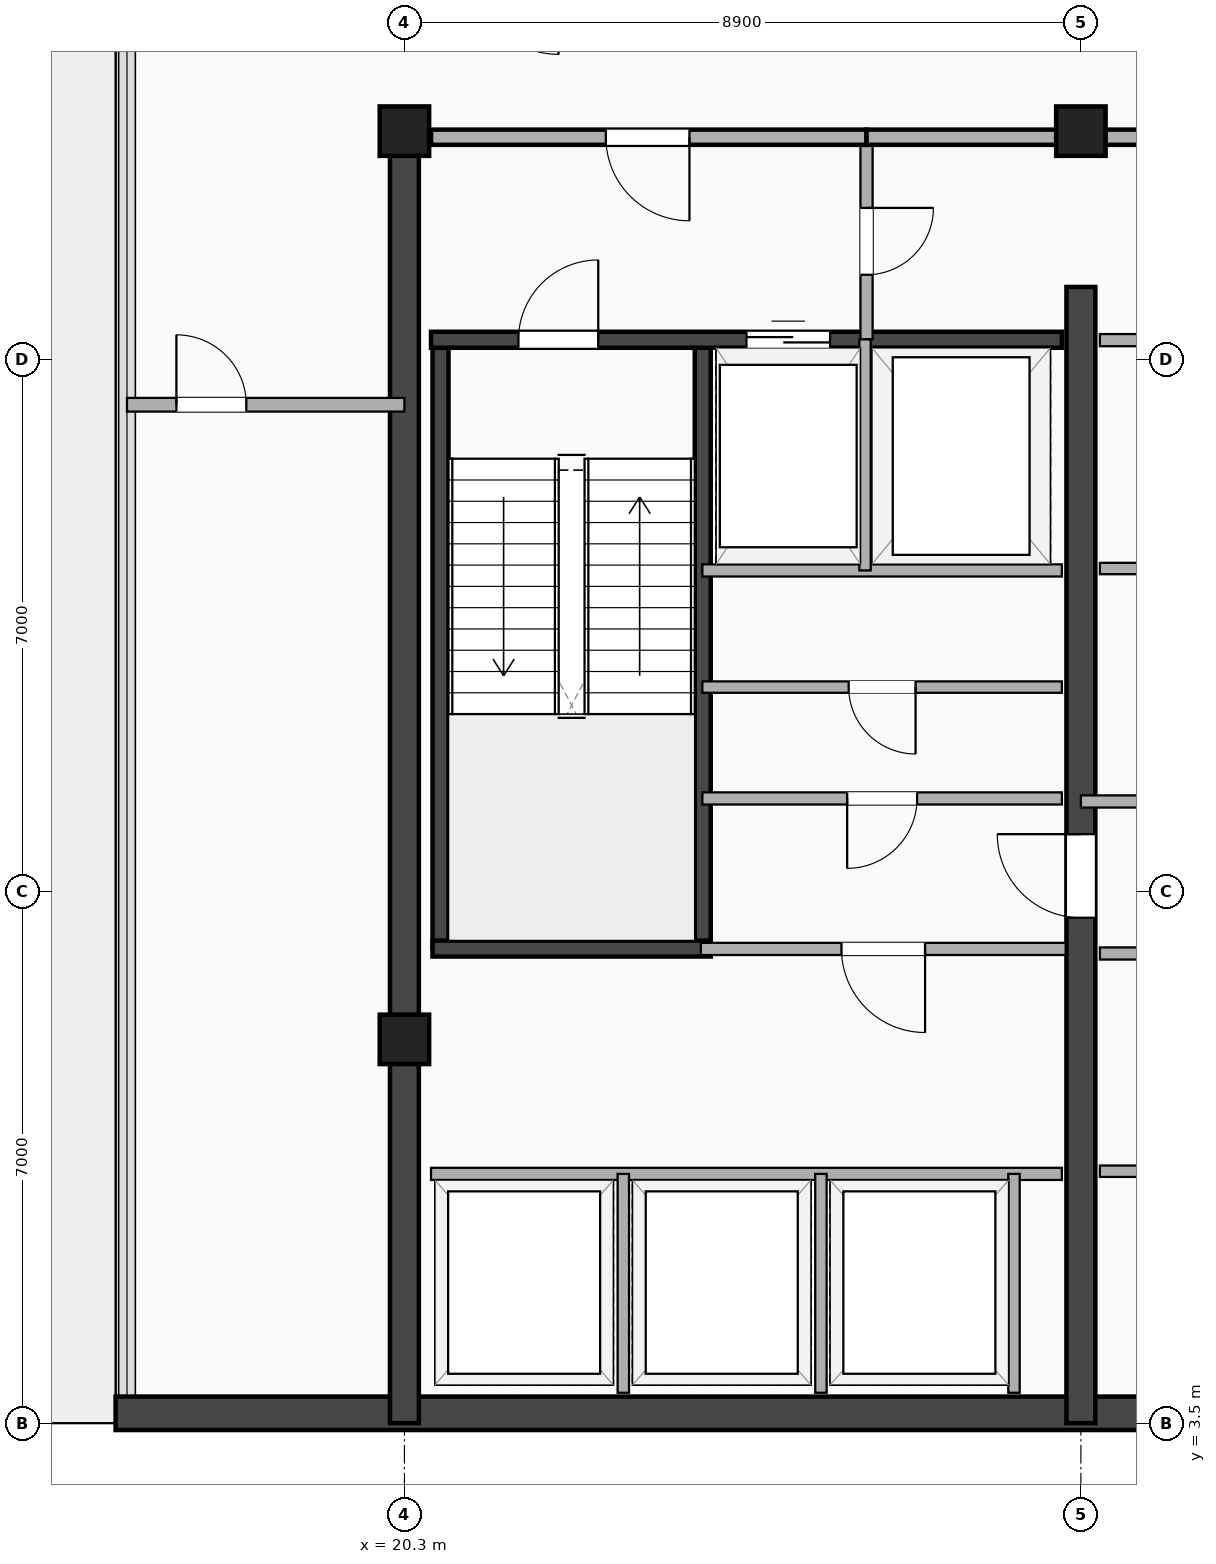
"""IFC4 building model, lengths in metres.
Left out: names, types, materials, properties, quantities, classifications, styles, units other than length and angle.
Written with IfcOpenShell. Run it as: python <this file> out.ifc"""

import sys

from ifc_helpers import new_model, si_unit, direction, frame, frame_2d, origin, origin_2d, place, context, subcontext, project, spatial, rectangle, extrude, element, fill, save


model = new_model("IFC4")
c1 = context("Model", 3, precision=1e-05, world=origin(), true_north=direction((0.0, 1.0)))
c2 = subcontext(c1, "Body", "Model", "MODEL_VIEW")
j1 = project(units=[si_unit("LENGTHUNIT", "METRE"), si_unit("PLANEANGLEUNIT", "RADIAN")], contexts=[c1])
p1 = place(None, origin())
s1 = spatial("IfcSite", under=j1, at=p1, CompositionType="ELEMENT")
p2 = place(p1, origin())
s2 = spatial("IfcBuilding", under=s1, at=p2, CompositionType="ELEMENT")
p3 = place(p2, frame((0.0, 0.0, 298.7)))
s3 = spatial("IfcBuildingStorey", under=s2, at=p3, CompositionType="ELEMENT", Elevation=298.7)
p4 = place(p3, frame((16.5, 3.63, 0.0), z_axis=(0.0, 0.0, 1.0), x_axis=(1.0, 0.0, 0.0)))
e1 = element("IfcWall", 1, at=p4, inside=s3, PredefinedType="SHEAR", context=c2, shape_type="SweptSolid", body=[
    extrude(rectangle(XDim=29.6, YDim=0.44, at=frame_2d((14.8, 0.0))), origin(), (0.0, 0.0, 1.0), 4.3),
])
p5 = place(p3, frame((20.3, 3.5, 0.0), z_axis=(0.0, 0.0, 1.0), x_axis=(0.0, 1.0, 0.0)))
e2 = element("IfcWall", 2, at=p5, inside=s3, PredefinedType="SHEAR", context=c2, shape_type="SweptSolid", body=[
    extrude(rectangle(XDim=16.9, YDim=0.38, at=frame_2d((8.45, 0.0))), origin(), (0.0, 0.0, 1.0), 4.3),
])
p6 = place(p3, frame((29.2, 3.5, 0.0), z_axis=(0.0, 0.0, 1.0), x_axis=(0.0, 1.0, 0.0)))
e3 = element("IfcWall", 3, at=p6, inside=s3, PredefinedType="SHEAR", context=c2, shape_type="SweptSolid", body=[
    extrude(rectangle(XDim=14.95, YDim=0.38, at=frame_2d((7.475, 0.0))), origin(), (0.0, 0.0, 1.0), 4.3),
])
p7 = place(p6, frame((7.75, 0.0, 0.0), z_axis=(0.0, 0.0, 1.0), x_axis=(-1.0, 0.0, 0.0)))
e4 = element("IfcOpeningElement", 4, at=p7, cuts=e3, PredefinedType="OPENING", context=c2, shape_type="SweptSolid", body=[
    extrude(rectangle(XDim=1.1, YDim=2.15, at=frame_2d((0.55, 1.075))), frame((0.0, 0.2, 0.0), z_axis=(0.0, -1.0, 0.0), x_axis=(1.0, 0.0, 0.0)), (0.0, 0.0, 1.0), 0.4),
])
for number, where, z_axis, x_axis in (
    (5, (20.775, 9.745, 0.0), (0.0, 0.0, 1.0), (0.0, 1.0, 0.0)),
    (6, (24.225, 9.745, 0.0), (0.0, 0.0, 1.0), (0.0, 1.0, 0.0)),
):
    element("IfcWall", number, at=place(p3, frame(where, z_axis=z_axis, x_axis=x_axis)), inside=s3, PredefinedType="SHEAR", context=c2, shape_type="SweptSolid", body=[
        extrude(rectangle(XDim=8.01, YDim=0.21, at=frame_2d((4.005, 0.0))), origin(), (0.0, 0.0, 1.0), 4.3),
    ])
p8 = place(p3, frame((20.67, 9.745, 0.0), z_axis=(0.0, 0.0, 1.0), x_axis=(1.0, 0.0, 0.0)))
e7 = element("IfcWall", 7, at=p8, inside=s3, PredefinedType="SHEAR", context=c2, shape_type="SweptSolid", body=[
    extrude(rectangle(XDim=3.66, YDim=0.21, at=frame_2d((1.83, 0.0))), origin(), (0.0, 0.0, 1.0), 4.3),
])
p9 = place(p3, frame((20.65, 17.755, 0.0), z_axis=(0.0, 0.0, 1.0), x_axis=(1.0, 0.0, 0.0)))
e8 = element("IfcWall", 8, at=p9, inside=s3, PredefinedType="SHEAR", context=c2, shape_type="SweptSolid", body=[
    extrude(rectangle(XDim=8.3, YDim=0.21, at=frame_2d((4.15, 0.0))), origin(), (0.0, 0.0, 1.0), 4.3),
])
p10 = place(p9, frame((2.2, 0.0, 0.0), z_axis=(0.0, 0.0, 1.0), x_axis=(-1.0, 0.0, 0.0)))
e9 = element("IfcOpeningElement", 9, at=p10, cuts=e8, PredefinedType="OPENING", context=c2, shape_type="SweptSolid", body=[
    extrude(rectangle(XDim=1.05, YDim=2.15, at=frame_2d((0.525, 1.075))), frame((0.0, 0.115, 0.0), z_axis=(0.0, -1.0, 0.0), x_axis=(1.0, 0.0, 0.0)), (0.0, 0.0, 1.0), 0.23),
])
p11 = place(p9, frame((4.15, 0.0, 0.0)))
e10 = element("IfcOpeningElement", 10, at=p11, cuts=e8, PredefinedType="OPENING", context=c2, shape_type="SweptSolid", body=[
    extrude(rectangle(XDim=1.1, YDim=2.18, at=frame_2d((0.55, 1.09))), frame((0.0, 0.115, 0.0), z_axis=(0.0, -1.0, 0.0), x_axis=(1.0, 0.0, 0.0)), (0.0, 0.0, 1.0), 0.23),
])
for number, where, z_axis, x_axis in (
    (11, (20.3, 8.55, -0.3), (0.0, 0.0, 1.0), (1.0, 0.0, 0.0)),
    (12, (20.3, 20.5, -0.3), (0.0, 0.0, 1.0), (1.0, 0.0, 0.0)),
    (13, (29.2, 20.5, -0.3), (0.0, 0.0, 1.0), (1.0, 0.0, 0.0)),
):
    element("IfcColumn", number, at=place(p3, frame(where, z_axis=z_axis, x_axis=x_axis)), inside=s3, PredefinedType="COLUMN", context=c2, shape_type="SweptSolid", body=[
        extrude(rectangle(XDim=0.65, YDim=0.65, at=origin_2d()), origin(), (0.0, 0.0, 1.0), 4.6),
    ])
p12 = place(p3, frame((26.38, 17.76, 0.0), z_axis=(0.0, 0.0, 1.0), x_axis=(0.0, 1.0, 0.0)))
e14 = element("IfcWall", 14, at=p12, inside=s3, PredefinedType="PARTITIONING", context=c2, shape_type="SweptSolid", body=[
    extrude(rectangle(XDim=2.66, YDim=0.16, at=frame_2d((1.33, 0.0))), origin(), (0.0, 0.0, 1.0), 3.512),
])
p13 = place(p12, frame((0.85, 0.0, 0.0)))
e15 = element("IfcOpeningElement", 15, at=p13, cuts=e14, PredefinedType="OPENING", context=c2, shape_type="SweptSolid", body=[
    extrude(rectangle(XDim=0.88, YDim=2.08, at=frame_2d((0.44, 1.04))), frame((0.0, 0.09, 0.0), z_axis=(0.0, -1.0, 0.0), x_axis=(1.0, 0.0, 0.0)), (0.0, 0.0, 1.0), 0.18),
])
p14 = place(p3, frame((24.22, 14.72, 0.0), z_axis=(0.0, 0.0, 1.0), x_axis=(1.0, 0.0, 0.0)))
e16 = element("IfcWall", 16, at=p14, inside=s3, PredefinedType="PARTITIONING", context=c2, shape_type="SweptSolid", body=[
    extrude(rectangle(XDim=4.73, YDim=0.16, at=frame_2d((2.365, 0.0))), origin(), (0.0, 0.0, 1.0), 4.3),
])
p15 = place(p3, frame((26.36, 14.72, 0.0), z_axis=(0.0, 0.0, 1.0), x_axis=(0.0, 1.0, 0.0)))
e17 = element("IfcWall", 17, at=p15, inside=s3, PredefinedType="PARTITIONING", context=c2, shape_type="SweptSolid", body=[
    extrude(rectangle(XDim=3.04, YDim=0.15, at=frame_2d((1.52, 0.0))), origin(), (0.0, 0.0, 1.0), 4.3),
])
p16 = place(p3, frame((20.65, 20.42, 0.0), z_axis=(0.0, 0.0, 1.0), x_axis=(1.0, 0.0, 0.0)))
e18 = element("IfcWall", 18, at=p16, inside=s3, PredefinedType="PARTITIONING", context=c2, shape_type="SweptSolid", body=[
    extrude(rectangle(XDim=5.73, YDim=0.2, at=frame_2d((2.865, 0.0))), origin(), (0.0, 0.0, 1.0), 2.605),
])
p17 = place(p16, frame((2.3, 0.0, 0.0)))
e19 = element("IfcOpeningElement", 19, at=p17, cuts=e18, PredefinedType="OPENING", context=c2, shape_type="SweptSolid", body=[
    extrude(rectangle(XDim=1.1, YDim=2.15, at=frame_2d((0.55, 1.075))), frame((0.0, 0.11, 0.0), z_axis=(0.0, -1.0, 0.0), x_axis=(1.0, 0.0, 0.0)), (0.0, 0.0, 1.0), 0.22),
])
p18 = place(p3, frame((26.38, 20.42, 0.0), z_axis=(0.0, 0.0, 1.0), x_axis=(1.0, 0.0, 0.0)))
e20 = element("IfcWall", 20, at=p18, inside=s3, PredefinedType="PARTITIONING", context=c2, shape_type="SweptSolid", body=[
    extrude(rectangle(XDim=2.82, YDim=0.2, at=frame_2d((1.41, 0.0))), origin(), (0.0, 0.0, 1.0), 2.605),
])
p19 = place(p3, frame((29.2, 20.42, 0.0), z_axis=(0.0, 0.0, 1.0), x_axis=(1.0, 0.0, 0.0)))
e21 = element("IfcWall", 21, at=p19, inside=s3, PredefinedType="PARTITIONING", context=c2, shape_type="SweptSolid", body=[
    extrude(rectangle(XDim=7.8, YDim=0.2, at=frame_2d((3.9, 0.0))), origin(), (0.0, 0.0, 1.0), 2.605),
])
p20 = place(p19, frame((3.409, 0.0, 0.0)))
e22 = element("IfcOpeningElement", 22, at=p20, cuts=e21, PredefinedType="OPENING", context=c2, shape_type="SweptSolid", body=[
    extrude(rectangle(XDim=1.1, YDim=2.15, at=frame_2d((0.55, 1.075))), frame((0.0, 0.11, 0.0), z_axis=(0.0, -1.0, 0.0), x_axis=(1.0, 0.0, 0.0)), (0.0, 0.0, 1.0), 0.22),
])
p21 = place(p3, frame((24.22, 11.72, 0.0), z_axis=(0.0, 0.0, 1.0), x_axis=(1.0, 0.0, 0.0)))
e23 = element("IfcWall", 23, at=p21, inside=s3, PredefinedType="PARTITIONING", context=c2, shape_type="SweptSolid", body=[
    extrude(rectangle(XDim=4.73, YDim=0.16, at=frame_2d((2.365, 0.0))), origin(), (0.0, 0.0, 1.0), 4.3),
])
p22 = place(p21, frame((1.905, 0.0, 0.0)))
e24 = element("IfcOpeningElement", 24, at=p22, cuts=e23, PredefinedType="OPENING", context=c2, shape_type="SweptSolid", body=[
    extrude(rectangle(XDim=0.92, YDim=2.08, at=frame_2d((0.46, 1.04))), frame((0.0, 0.09, 0.0), z_axis=(0.0, -1.0, 0.0), x_axis=(1.0, 0.0, 0.0)), (0.0, 0.0, 1.0), 0.18),
])
p23 = place(p3, frame((24.22, 13.185, 0.0), z_axis=(0.0, 0.0, 1.0), x_axis=(1.0, 0.0, 0.0)))
e25 = element("IfcWall", 25, at=p23, inside=s3, PredefinedType="PARTITIONING", context=c2, shape_type="SweptSolid", body=[
    extrude(rectangle(XDim=4.73, YDim=0.15, at=frame_2d((2.365, 0.0))), origin(), (0.0, 0.0, 1.0), 4.3),
])
p24 = place(p23, frame((1.925, 0.0, 0.0)))
e26 = element("IfcOpeningElement", 26, at=p24, cuts=e25, PredefinedType="OPENING", context=c2, shape_type="SweptSolid", body=[
    extrude(rectangle(XDim=0.88, YDim=2.08, at=frame_2d((0.44, 1.04))), frame((0.0, 0.085, 0.0), z_axis=(0.0, -1.0, 0.0), x_axis=(1.0, 0.0, 0.0)), (0.0, 0.0, 1.0), 0.17),
])
p25 = place(p3, frame((20.65, 6.78, 0.0), z_axis=(0.0, 0.0, 1.0), x_axis=(1.0, 0.0, 0.0)))
e27 = element("IfcWall", 27, at=p25, inside=s3, PredefinedType="PARTITIONING", context=c2, shape_type="SweptSolid", body=[
    extrude(rectangle(XDim=8.3, YDim=0.16, at=frame_2d((4.15, 0.0))), origin(), (0.0, 0.0, 1.0), 4.3),
])
for number, where, z_axis, x_axis in (
    (28, (23.18, 3.9, 0.0), (0.0, 0.0, 1.0), (0.0, 1.0, 0.0)),
    (29, (25.78, 3.9, 0.0), (0.0, 0.0, 1.0), (0.0, 1.0, 0.0)),
    (30, (28.32, 3.9, 0.0), (0.0, 0.0, 1.0), (0.0, 1.0, 0.0)),
):
    element("IfcWall", number, at=place(p3, frame(where, z_axis=z_axis, x_axis=x_axis)), inside=s3, PredefinedType="PARTITIONING", context=c2, shape_type="SweptSolid", body=[
        extrude(rectangle(XDim=2.88, YDim=0.15, at=frame_2d((1.44, 0.0))), origin(), (0.0, 0.0, 1.0), 4.3),
    ])
p26 = place(p3, frame((24.2, 9.74, 0.0), z_axis=(0.0, 0.0, 1.0), x_axis=(1.0, 0.0, 0.0)))
e31 = element("IfcWall", 31, at=p26, inside=s3, PredefinedType="PARTITIONING", context=c2, shape_type="SweptSolid", body=[
    extrude(rectangle(XDim=4.8, YDim=0.16, at=frame_2d((2.4, 0.0))), origin(), (0.0, 0.0, 1.0), 4.3),
])
p27 = place(p26, frame((1.85, 0.0, 0.0)))
e32 = element("IfcOpeningElement", 32, at=p27, cuts=e31, PredefinedType="OPENING", context=c2, shape_type="SweptSolid", body=[
    extrude(rectangle(XDim=1.1, YDim=2.15, at=frame_2d((0.55, 1.075))), frame((0.0, 0.09, 0.0), z_axis=(0.0, -1.0, 0.0), x_axis=(1.0, 0.0, 0.0)), (0.0, 0.0, 1.0), 0.18),
])
p28 = place(p3, frame((29.45, 9.68, 0.0), z_axis=(0.0, 0.0, 1.0), x_axis=(1.0, 0.0, 0.0)))
e33 = element("IfcWall", 33, at=p28, inside=s3, PredefinedType="PARTITIONING", context=c2, shape_type="SweptSolid", body=[
    extrude(rectangle(XDim=7.3, YDim=0.16, at=frame_2d((3.65, 0.0))), origin(), (0.0, 0.0, 1.0), 4.3),
])
p29 = place(p28, frame((4.11, 0.0, 0.0), z_axis=(0.0, 0.0, 1.0), x_axis=(-1.0, 0.0, 0.0)))
e34 = element("IfcOpeningElement", 34, at=p29, cuts=e33, PredefinedType="OPENING", context=c2, shape_type="SweptSolid", body=[
    extrude(rectangle(XDim=0.92, YDim=2.08, at=frame_2d((0.46, 1.04))), frame((0.0, 0.09, 0.0), z_axis=(0.0, -1.0, 0.0), x_axis=(1.0, 0.0, 0.0)), (0.0, 0.0, 1.0), 0.18),
])
p30 = place(p3, frame((29.45, 6.815, 0.0), z_axis=(0.0, 0.0, 1.0), x_axis=(1.0, 0.0, 0.0)))
e35 = element("IfcWall", 35, at=p30, inside=s3, PredefinedType="PARTITIONING", context=c2, shape_type="SweptSolid", body=[
    extrude(rectangle(XDim=7.3, YDim=0.15, at=frame_2d((3.65, 0.0))), origin(), (0.0, 0.0, 1.0), 4.3),
])
p31 = place(p30, frame((4.09, 0.0, 0.0), z_axis=(0.0, 0.0, 1.0), x_axis=(-1.0, 0.0, 0.0)))
e36 = element("IfcOpeningElement", 36, at=p31, cuts=e35, PredefinedType="OPENING", context=c2, shape_type="SweptSolid", body=[
    extrude(rectangle(XDim=0.88, YDim=2.08, at=frame_2d((0.44, 1.04))), frame((0.0, 0.085, 0.0), z_axis=(0.0, -1.0, 0.0), x_axis=(1.0, 0.0, 0.0)), (0.0, 0.0, 1.0), 0.17),
])
p32 = place(p3, frame((29.2, 11.68, 0.0), z_axis=(0.0, 0.0, 1.0), x_axis=(1.0, 0.0, 0.0)))
e37 = element("IfcWall", 37, at=p32, inside=s3, PredefinedType="PARTITIONING", context=c2, shape_type="SweptSolid", body=[
    extrude(rectangle(XDim=5.72, YDim=0.16, at=frame_2d((2.86, 0.0))), origin(), (0.0, 0.0, 1.0), 4.3),
])
p33 = place(p3, frame((29.45, 17.75, 0.0), z_axis=(0.0, 0.0, 1.0), x_axis=(1.0, 0.0, 0.0)))
e38 = element("IfcWall", 38, at=p33, inside=s3, PredefinedType="PARTITIONING", context=c2, shape_type="SweptSolid", body=[
    extrude(rectangle(XDim=5.43, YDim=0.16, at=frame_2d((2.715, 0.0))), origin(), (0.0, 0.0, 1.0), 4.3),
])
p34 = place(p33, frame((3.175, 0.0, 0.0), z_axis=(0.0, 0.0, 1.0), x_axis=(-1.0, 0.0, 0.0)))
e39 = element("IfcOpeningElement", 39, at=p34, cuts=e38, PredefinedType="OPENING", context=c2, shape_type="SweptSolid", body=[
    extrude(rectangle(XDim=0.92, YDim=2.08, at=frame_2d((0.46, 1.04))), frame((0.0, 0.09, 0.0), z_axis=(0.0, -1.0, 0.0), x_axis=(1.0, 0.0, 0.0)), (0.0, 0.0, 1.0), 0.18),
])
p35 = place(p3, frame((29.45, 14.745, 0.0), z_axis=(0.0, 0.0, 1.0), x_axis=(1.0, 0.0, 0.0)))
e40 = element("IfcWall", 40, at=p35, inside=s3, PredefinedType="PARTITIONING", context=c2, shape_type="SweptSolid", body=[
    extrude(rectangle(XDim=5.43, YDim=0.15, at=frame_2d((2.715, 0.0))), origin(), (0.0, 0.0, 1.0), 4.3),
])
p36 = place(p35, frame((3.155, 0.0, 0.0), z_axis=(0.0, 0.0, 1.0), x_axis=(-1.0, 0.0, 0.0)))
e41 = element("IfcOpeningElement", 41, at=p36, cuts=e40, PredefinedType="OPENING", context=c2, shape_type="SweptSolid", body=[
    extrude(rectangle(XDim=0.88, YDim=2.08, at=frame_2d((0.44, 1.04))), frame((0.0, 0.085, 0.0), z_axis=(0.0, -1.0, 0.0), x_axis=(1.0, 0.0, 0.0)), (0.0, 0.0, 1.0), 0.17),
])
p37 = place(p3, frame((16.65, 16.9, 0.0), z_axis=(0.0, 0.0, 1.0), x_axis=(1.0, 0.0, 0.0)))
e42 = element("IfcWall", 42, at=p37, inside=s3, PredefinedType="PARTITIONING", context=c2, shape_type="SweptSolid", body=[
    extrude(rectangle(XDim=3.65, YDim=0.18, at=frame_2d((1.825, 0.0))), origin(), (0.0, 0.0, 1.0), 3.885),
])
p38 = place(p37, frame((1.57, 0.0, 0.0), z_axis=(0.0, 0.0, 1.0), x_axis=(-1.0, 0.0, 0.0)))
e43 = element("IfcOpeningElement", 43, at=p38, cuts=e42, PredefinedType="OPENING", context=c2, shape_type="SweptSolid", body=[
    extrude(rectangle(XDim=0.92, YDim=2.08, at=frame_2d((0.46, 1.04))), frame((0.0, 0.1, 0.0), z_axis=(0.0, -1.0, 0.0), x_axis=(1.0, 0.0, 0.0)), (0.0, 0.0, 1.0), 0.2),
])
p39 = place(p10, origin())
e44 = element("IfcDoor", 44, at=p39, inside=s3, OperationType="SINGLE_SWING_RIGHT", PredefinedType="DOOR", context=c2, shape_type="SweptSolid", body=[
    extrude(rectangle(XDim=1.05, YDim=2.15, at=frame_2d((0.525, 1.075))), frame((0.0, 0.025, 0.0), z_axis=(0.0, -1.0, 0.0), x_axis=(1.0, 0.0, 0.0)), (0.0, 0.0, 1.0), 0.05),
])
fill(e9, e44)
p40 = place(p11, origin())
e45 = element("IfcDoor", 45, at=p40, inside=s3, OperationType="DOUBLE_DOOR_SLIDING", PredefinedType="DOOR", context=c2, shape_type="SweptSolid", body=[
    extrude(rectangle(XDim=1.1, YDim=2.18, at=frame_2d((0.55, 1.09))), frame((0.0, 0.025, 0.0), z_axis=(0.0, -1.0, 0.0), x_axis=(1.0, 0.0, 0.0)), (0.0, 0.0, 1.0), 0.05),
])
fill(e10, e45)
p41 = place(p7, origin())
e46 = element("IfcDoor", 46, at=p41, inside=s3, OperationType="SINGLE_SWING_RIGHT", PredefinedType="DOOR", context=c2, shape_type="SweptSolid", body=[
    extrude(rectangle(XDim=1.1, YDim=2.15, at=frame_2d((0.55, 1.075))), frame((0.0, 0.025, 0.0), z_axis=(0.0, -1.0, 0.0), x_axis=(1.0, 0.0, 0.0)), (0.0, 0.0, 1.0), 0.05),
])
fill(e4, e46)
p42 = place(p13, origin())
e47 = element("IfcDoor", 47, at=p42, inside=s3, OperationType="SINGLE_SWING_RIGHT", PredefinedType="DOOR", context=c2, shape_type="SweptSolid", body=[
    extrude(rectangle(XDim=0.88, YDim=2.08, at=frame_2d((0.44, 1.04))), frame((0.0, 0.025, 0.0), z_axis=(0.0, -1.0, 0.0), x_axis=(1.0, 0.0, 0.0)), (0.0, 0.0, 1.0), 0.05),
])
fill(e15, e47)
p43 = place(p17, origin())
e48 = element("IfcDoor", 48, at=p43, inside=s3, OperationType="SINGLE_SWING_RIGHT", PredefinedType="DOOR", context=c2, shape_type="SweptSolid", body=[
    extrude(rectangle(XDim=1.1, YDim=2.15, at=frame_2d((0.55, 1.075))), frame((0.0, 0.025, 0.0), z_axis=(0.0, -1.0, 0.0), x_axis=(1.0, 0.0, 0.0)), (0.0, 0.0, 1.0), 0.05),
])
fill(e19, e48)
p44 = place(p22, origin())
e49 = element("IfcDoor", 49, at=p44, inside=s3, OperationType="SINGLE_SWING_LEFT", PredefinedType="DOOR", context=c2, shape_type="SweptSolid", body=[
    extrude(rectangle(XDim=0.92, YDim=2.08, at=frame_2d((0.46, 1.04))), frame((0.0, 0.025, 0.0), z_axis=(0.0, -1.0, 0.0), x_axis=(1.0, 0.0, 0.0)), (0.0, 0.0, 1.0), 0.05),
])
fill(e24, e49)
p45 = place(p24, origin())
e50 = element("IfcDoor", 50, at=p45, inside=s3, OperationType="SINGLE_SWING_RIGHT", PredefinedType="DOOR", context=c2, shape_type="SweptSolid", body=[
    extrude(rectangle(XDim=0.88, YDim=2.08, at=frame_2d((0.44, 1.04))), frame((0.0, 0.025, 0.0), z_axis=(0.0, -1.0, 0.0), x_axis=(1.0, 0.0, 0.0)), (0.0, 0.0, 1.0), 0.05),
])
fill(e26, e50)
p46 = place(p27, origin())
e51 = element("IfcDoor", 51, at=p46, inside=s3, OperationType="SINGLE_SWING_RIGHT", PredefinedType="DOOR", context=c2, shape_type="SweptSolid", body=[
    extrude(rectangle(XDim=1.1, YDim=2.15, at=frame_2d((0.55, 1.075))), frame((0.0, 0.025, 0.0), z_axis=(0.0, -1.0, 0.0), x_axis=(1.0, 0.0, 0.0)), (0.0, 0.0, 1.0), 0.05),
])
fill(e32, e51)
p47 = place(p38, origin())
e52 = element("IfcDoor", 52, at=p47, inside=s3, OperationType="SINGLE_SWING_LEFT", PredefinedType="DOOR", context=c2, shape_type="SweptSolid", body=[
    extrude(rectangle(XDim=0.92, YDim=2.08, at=frame_2d((0.46, 1.04))), frame((0.0, 0.025, 0.0), z_axis=(0.0, -1.0, 0.0), x_axis=(1.0, 0.0, 0.0)), (0.0, 0.0, 1.0), 0.05),
])
fill(e43, e52)
save(model, sys.argv[1])
